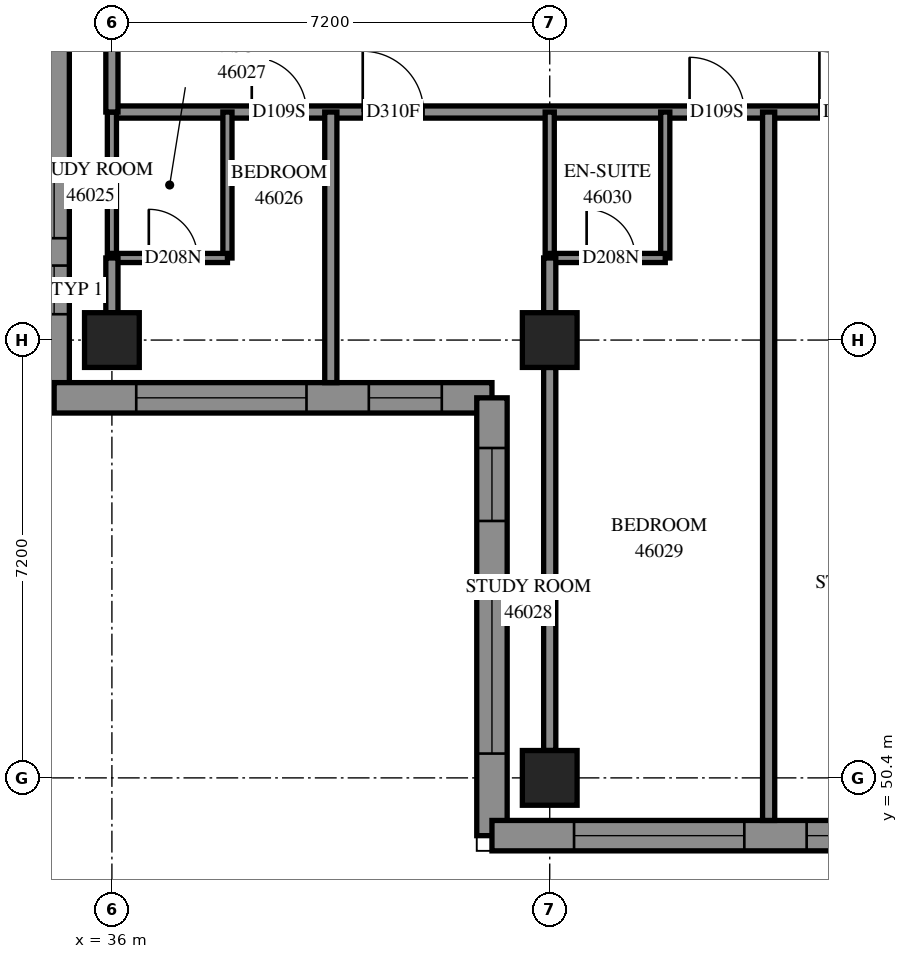
"""IFC4 building model, lengths in metres.
Left out: names, types, materials, properties, quantities, classifications, styles, units other than length and angle.
Written with IfcOpenShell. Run it as: python <this file> out.ifc"""

import sys

from ifc_helpers import new_model, si_unit, direction, frame, frame_2d, origin, origin_2d, place, context, subcontext, project, spatial, polyline, rectangle, outline, extrude, element, fill, save


model = new_model("IFC4")
c1 = context("Model", 3, precision=1e-05, world=origin(), true_north=direction((0.0, 1.0)))
c2 = subcontext(c1, "Body", "Model", "MODEL_VIEW")
j1 = project(units=[si_unit("LENGTHUNIT", "METRE"), si_unit("PLANEANGLEUNIT", "RADIAN")], contexts=[c1])
p1 = place(None, origin())
s1 = spatial("IfcSite", under=j1, at=p1, CompositionType="ELEMENT")
p2 = place(p1, origin())
s2 = spatial("IfcBuilding", under=s1, at=p2, CompositionType="ELEMENT")
p3 = place(p2, frame((0.0, 0.0, 169.4)))
s3 = spatial("IfcBuildingStorey", under=s2, at=p3, CompositionType="ELEMENT", Elevation=169.4)
for number, where, z_axis, x_axis in (
    (1, (36.0, 57.6, 0.0), (0.0, 0.0, 1.0), (1.0, 0.0, 0.0)),
    (2, (43.2, 50.4, 0.0), (0.0, 0.0, 1.0), (1.0, 0.0, 0.0)),
    (3, (43.2, 57.6, 0.0), (0.0, 0.0, 1.0), (1.0, 0.0, 0.0)),
):
    element("IfcColumn", number, at=place(p3, frame(where, z_axis=z_axis, x_axis=x_axis)), inside=s3, PredefinedType="COLUMN", context=c2, shape_type="SweptSolid", body=[
        extrude(rectangle(XDim=0.9, YDim=0.9, at=origin_2d()), origin(), (0.0, 0.0, 1.0), 3.1),
    ])
p4 = place(p3, frame((35.05, 62.647, 0.0), z_axis=(0.0, 0.0, 1.0), x_axis=(0.0, -1.0, 0.0)))
e4 = element("IfcWall", 4, at=p4, inside=s3, PredefinedType="SOLIDWALL", context=c2, shape_type="SweptSolid", body=[
    extrude(outline(polyline([(0.25, -0.25), (6.247, -0.25), (5.747, 0.25), (-0.25, 0.25), (0.25, -0.25)])), origin(), (0.0, 0.0, 1.0), 3.1),
])
p5 = place(p4, frame((2.072, 0.0, 0.45)))
e5 = element("IfcOpeningElement", 5, at=p5, cuts=e4, PredefinedType="OPENING", context=c2, shape_type="SweptSolid", body=[
    extrude(rectangle(XDim=1.3, YDim=2.5, at=frame_2d((0.65, 1.25))), frame((0.0, 0.26, 0.0), z_axis=(0.0, -1.0, 0.0), x_axis=(1.0, 0.0, 0.0)), (0.0, 0.0, 1.0), 0.52),
])
p6 = place(p4, frame((3.822, 0.0, 0.45)))
e6 = element("IfcOpeningElement", 6, at=p6, cuts=e4, PredefinedType="OPENING", context=c2, shape_type="SweptSolid", body=[
    extrude(rectangle(XDim=0.8, YDim=2.5, at=frame_2d((0.4, 1.25))), frame((0.0, 0.26, 0.0), z_axis=(0.0, -1.0, 0.0), x_axis=(1.0, 0.0, 0.0)), (0.0, 0.0, 1.0), 0.52),
])
p7 = place(p3, frame((35.05, 56.65, 0.0), z_axis=(0.0, 0.0, 1.0), x_axis=(1.0, 0.0, 0.0)))
e7 = element("IfcWall", 7, at=p7, inside=s3, PredefinedType="SOLIDWALL", context=c2, shape_type="SweptSolid", body=[
    extrude(outline(polyline([(-0.25, -0.25), (6.95, -0.25), (7.45, 0.25), (0.25, 0.25), (-0.25, -0.25)])), origin(), (0.0, 0.0, 1.0), 3.1),
])
p8 = place(p7, frame((1.35, 0.0, 0.45)))
e8 = element("IfcOpeningElement", 8, at=p8, cuts=e7, PredefinedType="OPENING", context=c2, shape_type="SweptSolid", body=[
    extrude(rectangle(XDim=2.8, YDim=2.5, at=frame_2d((1.4, 1.25))), frame((0.0, 0.26, 0.0), z_axis=(0.0, -1.0, 0.0), x_axis=(1.0, 0.0, 0.0)), (0.0, 0.0, 1.0), 0.52),
])
p9 = place(p7, frame((5.175, 0.0, 0.45)))
e9 = element("IfcOpeningElement", 9, at=p9, cuts=e7, PredefinedType="OPENING", context=c2, shape_type="SweptSolid", body=[
    extrude(rectangle(XDim=1.2, YDim=2.5, at=frame_2d((0.6, 1.25))), frame((0.0, 0.26, 0.0), z_axis=(0.0, -1.0, 0.0), x_axis=(1.0, 0.0, 0.0)), (0.0, 0.0, 1.0), 0.52),
])
p10 = place(p3, frame((42.25, 56.65, 0.0), z_axis=(0.0, 0.0, 1.0), x_axis=(0.0, -1.0, 0.0)))
e10 = element("IfcWall", 10, at=p10, inside=s3, PredefinedType="SOLIDWALL", context=c2, shape_type="SweptSolid", body=[
    extrude(outline(polyline([(0.25, -0.25), (7.45, -0.25), (6.95, 0.25), (-0.25, 0.25), (0.25, -0.25)])), origin(), (0.0, 0.0, 1.0), 3.1),
])
p11 = place(p10, frame((3.05, 0.0, 0.45)))
e11 = element("IfcOpeningElement", 11, at=p11, cuts=e10, PredefinedType="OPENING", context=c2, shape_type="SweptSolid", body=[
    extrude(rectangle(XDim=2.8, YDim=2.5, at=frame_2d((1.4, 1.25))), frame((0.0, 0.26, 0.0), z_axis=(0.0, -1.0, 0.0), x_axis=(1.0, 0.0, 0.0)), (0.0, 0.0, 1.0), 0.52),
])
p12 = place(p10, frame((0.825, 0.0, 0.45)))
e12 = element("IfcOpeningElement", 12, at=p12, cuts=e10, PredefinedType="OPENING", context=c2, shape_type="SweptSolid", body=[
    extrude(rectangle(XDim=1.2, YDim=2.5, at=frame_2d((0.6, 1.25))), frame((0.0, 0.26, 0.0), z_axis=(0.0, -1.0, 0.0), x_axis=(1.0, 0.0, 0.0)), (0.0, 0.0, 1.0), 0.52),
])
p13 = place(p3, frame((42.25, 49.45, 0.0), z_axis=(0.0, 0.0, 1.0), x_axis=(1.0, 0.0, 0.0)))
e13 = element("IfcWall", 13, at=p13, inside=s3, PredefinedType="SOLIDWALL", context=c2, shape_type="SweptSolid", body=[
    extrude(outline(polyline([(-0.25, -0.25), (6.95, -0.25), (7.45, 0.25), (0.25, 0.25), (-0.25, -0.25)])), origin(), (0.0, 0.0, 1.0), 3.1),
])
p14 = place(p13, frame((1.35, 0.0, 0.45)))
e14 = element("IfcOpeningElement", 14, at=p14, cuts=e13, PredefinedType="OPENING", context=c2, shape_type="SweptSolid", body=[
    extrude(rectangle(XDim=2.8, YDim=2.5, at=frame_2d((1.4, 1.25))), frame((0.0, 0.26, 0.0), z_axis=(0.0, -1.0, 0.0), x_axis=(1.0, 0.0, 0.0)), (0.0, 0.0, 1.0), 0.52),
])
p15 = place(p13, frame((5.175, 0.0, 0.45)))
e15 = element("IfcOpeningElement", 15, at=p15, cuts=e13, PredefinedType="OPENING", context=c2, shape_type="SweptSolid", body=[
    extrude(rectangle(XDim=1.2, YDim=2.5, at=frame_2d((0.6, 1.25))), frame((0.0, 0.26, 0.0), z_axis=(0.0, -1.0, 0.0), x_axis=(1.0, 0.0, 0.0)), (0.0, 0.0, 1.0), 0.52),
])
p16 = place(p3, frame((36.0, 61.35, 0.0), z_axis=(0.0, 0.0, 1.0), x_axis=(1.0, 0.0, 0.0)))
e16 = element("IfcWall", 16, at=p16, inside=s3, PredefinedType="PARTITIONING", context=c2, shape_type="SweptSolid", body=[
    extrude(rectangle(XDim=16.95, YDim=0.2, at=frame_2d((8.475, 0.0))), origin(), (0.0, 0.0, 1.0), 3.1),
])
p17 = place(p16, frame((2.3, 0.0, 0.0)))
e17 = element("IfcOpeningElement", 17, at=p17, cuts=e16, PredefinedType="OPENING", context=c2, shape_type="SweptSolid", body=[
    extrude(rectangle(XDim=0.9, YDim=2.1, at=frame_2d((0.45, 1.05))), frame((0.0, 0.11, 0.0), z_axis=(0.0, -1.0, 0.0), x_axis=(1.0, 0.0, 0.0)), (0.0, 0.0, 1.0), 0.22),
])
p18 = place(p16, frame((4.125, 0.0, 0.0)))
e18 = element("IfcOpeningElement", 18, at=p18, cuts=e16, PredefinedType="OPENING", context=c2, shape_type="SweptSolid", body=[
    extrude(rectangle(XDim=1.0, YDim=2.1, at=frame_2d((0.5, 1.05))), frame((0.0, 0.11, 0.0), z_axis=(0.0, -1.0, 0.0), x_axis=(1.0, 0.0, 0.0)), (0.0, 0.0, 1.0), 0.22),
])
p19 = place(p16, frame((9.5, 0.0, 0.0)))
e19 = element("IfcOpeningElement", 19, at=p19, cuts=e16, PredefinedType="OPENING", context=c2, shape_type="SweptSolid", body=[
    extrude(rectangle(XDim=0.9, YDim=2.1, at=frame_2d((0.45, 1.05))), frame((0.0, 0.11, 0.0), z_axis=(0.0, -1.0, 0.0), x_axis=(1.0, 0.0, 0.0)), (0.0, 0.0, 1.0), 0.22),
])
p20 = place(p16, frame((11.635, 0.0, 0.0)))
e20 = element("IfcOpeningElement", 20, at=p20, cuts=e16, PredefinedType="OPENING", context=c2, shape_type="SweptSolid", body=[
    extrude(rectangle(XDim=1.0, YDim=2.1, at=frame_2d((0.5, 1.05))), frame((0.0, 0.11, 0.0), z_axis=(0.0, -1.0, 0.0), x_axis=(1.0, 0.0, 0.0)), (0.0, 0.0, 1.0), 0.22),
])
p21 = place(p16, frame((15.803, 0.0, 0.0)))
e21 = element("IfcOpeningElement", 21, at=p21, cuts=e16, PredefinedType="OPENING", context=c2, shape_type="SweptSolid", body=[
    extrude(rectangle(XDim=1.0, YDim=2.1, at=frame_2d((0.5, 1.05))), frame((0.0, 0.11, 0.0), z_axis=(0.0, -1.0, 0.0), x_axis=(1.0, 0.0, 0.0)), (0.0, 0.0, 1.0), 0.22),
])
p22 = place(p3, frame((46.8, 49.7, 0.0), z_axis=(0.0, 0.0, 1.0), x_axis=(0.0, 1.0, 0.0)))
e22 = element("IfcWall", 22, at=p22, inside=s3, PredefinedType="PARTITIONING", context=c2, shape_type="SweptSolid", body=[
    extrude(rectangle(XDim=11.65, YDim=0.2, at=frame_2d((5.825, 0.0))), origin(), (0.0, 0.0, 1.0), 3.1),
])
p23 = place(p3, frame((43.2, 50.85, 0.0), z_axis=(0.0, 0.0, 1.0), x_axis=(0.0, 1.0, 0.0)))
e23 = element("IfcWall", 23, at=p23, inside=s3, PredefinedType="PARTITIONING", context=c2, shape_type="SweptSolid", body=[
    extrude(rectangle(XDim=6.3, YDim=0.2, at=frame_2d((3.15, 0.0))), origin(), (0.0, 0.0, 1.0), 2.6),
])
p24 = place(p3, frame((39.6, 56.9, 0.0), z_axis=(0.0, 0.0, 1.0), x_axis=(0.0, 1.0, 0.0)))
e24 = element("IfcWall", 24, at=p24, inside=s3, PredefinedType="PARTITIONING", context=c2, shape_type="SweptSolid", body=[
    extrude(rectangle(XDim=4.45, YDim=0.2, at=frame_2d((2.225, 0.0))), origin(), (0.0, 0.0, 1.0), 3.1),
])
p25 = place(p3, frame((37.9, 58.95, 0.0), z_axis=(0.0, 0.0, 1.0), x_axis=(0.0, 1.0, 0.0)))
e25 = element("IfcWall", 25, at=p25, inside=s3, PredefinedType="PARTITIONING", context=c2, shape_type="SweptSolid", body=[
    extrude(rectangle(XDim=2.4, YDim=0.15, at=frame_2d((1.2, 0.0))), origin(), (0.0, 0.0, 1.0), 3.1),
])
p26 = place(p3, frame((36.0, 58.95, 0.0), z_axis=(0.0, 0.0, 1.0), x_axis=(0.0, 1.0, 0.0)))
e26 = element("IfcWall", 26, at=p26, inside=s3, PredefinedType="PARTITIONING", context=c2, shape_type="SweptSolid", body=[
    extrude(rectangle(XDim=2.4, YDim=0.15, at=frame_2d((1.2, 0.0))), origin(), (0.0, 0.0, 1.0), 2.6),
])
for number, where, z_axis, x_axis in (
    (27, (45.1, 58.95, 0.0), (0.0, 0.0, 1.0), (0.0, 1.0, 0.0)),
    (28, (43.2, 58.95, 0.0), (0.0, 0.0, 1.0), (0.0, 1.0, 0.0)),
):
    element("IfcWall", number, at=place(p3, frame(where, z_axis=z_axis, x_axis=x_axis)), inside=s3, PredefinedType="PARTITIONING", context=c2, shape_type="SweptSolid", body=[
        extrude(rectangle(XDim=2.4, YDim=0.15, at=frame_2d((1.2, 0.0))), origin(), (0.0, 0.0, 1.0), 3.1),
    ])
p27 = place(p3, frame((36.0, 61.35, 0.0), z_axis=(0.0, 0.0, 1.0), x_axis=(0.0, 1.0, 0.0)))
e29 = element("IfcWall", 29, at=p27, inside=s3, PredefinedType="PARTITIONING", context=c2, shape_type="SweptSolid", body=[
    extrude(rectangle(XDim=2.1, YDim=0.2, at=frame_2d((1.05, 0.0))), origin(), (0.0, 0.0, 1.0), 2.6),
])
p28 = place(p3, frame((36.0, 58.95, 0.0), z_axis=(0.0, 0.0, 1.0), x_axis=(1.0, 0.0, 0.0)))
e30 = element("IfcWall", 30, at=p28, inside=s3, PredefinedType="PARTITIONING", context=c2, shape_type="SweptSolid", body=[
    extrude(rectangle(XDim=1.9, YDim=0.15, at=frame_2d((0.95, 0.0))), origin(), (0.0, 0.0, 1.0), 3.1),
])
p29 = place(p28, frame((0.607, 0.0, 0.0)))
e31 = element("IfcOpeningElement", 31, at=p29, cuts=e30, PredefinedType="OPENING", context=c2, shape_type="SweptSolid", body=[
    extrude(rectangle(XDim=0.8, YDim=2.1, at=frame_2d((0.4, 1.05))), frame((0.0, 0.085, 0.0), z_axis=(0.0, -1.0, 0.0), x_axis=(1.0, 0.0, 0.0)), (0.0, 0.0, 1.0), 0.17),
])
p30 = place(p3, frame((43.2, 58.95, 0.0), z_axis=(0.0, 0.0, 1.0), x_axis=(1.0, 0.0, 0.0)))
e32 = element("IfcWall", 32, at=p30, inside=s3, PredefinedType="PARTITIONING", context=c2, shape_type="SweptSolid", body=[
    extrude(rectangle(XDim=1.9, YDim=0.15, at=frame_2d((0.95, 0.0))), origin(), (0.0, 0.0, 1.0), 3.1),
])
p31 = place(p30, frame((0.607, 0.0, 0.0)))
e33 = element("IfcOpeningElement", 33, at=p31, cuts=e32, PredefinedType="OPENING", context=c2, shape_type="SweptSolid", body=[
    extrude(rectangle(XDim=0.8, YDim=2.1, at=frame_2d((0.4, 1.05))), frame((0.0, 0.085, 0.0), z_axis=(0.0, -1.0, 0.0), x_axis=(1.0, 0.0, 0.0)), (0.0, 0.0, 1.0), 0.17),
])
p32 = place(p3, frame((36.0, 58.05, 0.0), z_axis=(0.0, 0.0, 1.0), x_axis=(0.0, 1.0, 0.0)))
e34 = element("IfcWall", 34, at=p32, inside=s3, PredefinedType="PARTITIONING", context=c2, shape_type="SweptSolid", body=[
    extrude(rectangle(XDim=0.9, YDim=0.2, at=frame_2d((0.45, 0.0))), origin(), (0.0, 0.0, 1.0), 2.6),
])
p33 = place(p3, frame((43.2, 58.05, 0.0), z_axis=(0.0, 0.0, 1.0), x_axis=(0.0, 1.0, 0.0)))
e35 = element("IfcWall", 35, at=p33, inside=s3, PredefinedType="PARTITIONING", context=c2, shape_type="SweptSolid", body=[
    extrude(rectangle(XDim=0.9, YDim=0.2, at=frame_2d((0.45, 0.0))), origin(), (0.0, 0.0, 1.0), 3.1),
])
p34 = place(p8, origin())
e36 = element("IfcWindow", 36, at=p34, inside=s3, PartitioningType="SINGLE_PANEL", PredefinedType="WINDOW", context=c2, shape_type="SweptSolid", body=[
    extrude(rectangle(XDim=2.8, YDim=2.5, at=frame_2d((1.4, 1.25))), frame((0.0, 0.18, 0.0), z_axis=(0.0, -1.0, 0.0), x_axis=(1.0, 0.0, 0.0)), (0.0, 0.0, 1.0), 0.06),
])
fill(e8, e36)
p35 = place(p9, origin())
e37 = element("IfcWindow", 37, at=p35, inside=s3, PartitioningType="SINGLE_PANEL", PredefinedType="WINDOW", context=c2, shape_type="SweptSolid", body=[
    extrude(rectangle(XDim=1.2, YDim=2.5, at=frame_2d((0.6, 1.25))), frame((0.0, 0.18, 0.0), z_axis=(0.0, -1.0, 0.0), x_axis=(1.0, 0.0, 0.0)), (0.0, 0.0, 1.0), 0.06),
])
fill(e9, e37)
p36 = place(p11, origin())
e38 = element("IfcWindow", 38, at=p36, inside=s3, PartitioningType="SINGLE_PANEL", PredefinedType="WINDOW", context=c2, shape_type="SweptSolid", body=[
    extrude(rectangle(XDim=2.8, YDim=2.5, at=frame_2d((1.4, 1.25))), frame((0.0, 0.18, 0.0), z_axis=(0.0, -1.0, 0.0), x_axis=(1.0, 0.0, 0.0)), (0.0, 0.0, 1.0), 0.06),
])
fill(e11, e38)
p37 = place(p12, origin())
e39 = element("IfcWindow", 39, at=p37, inside=s3, PartitioningType="SINGLE_PANEL", PredefinedType="WINDOW", context=c2, shape_type="SweptSolid", body=[
    extrude(rectangle(XDim=1.2, YDim=2.5, at=frame_2d((0.6, 1.25))), frame((0.0, 0.18, 0.0), z_axis=(0.0, -1.0, 0.0), x_axis=(1.0, 0.0, 0.0)), (0.0, 0.0, 1.0), 0.06),
])
fill(e12, e39)
p38 = place(p14, origin())
e40 = element("IfcWindow", 40, at=p38, inside=s3, PartitioningType="SINGLE_PANEL", PredefinedType="WINDOW", context=c2, shape_type="SweptSolid", body=[
    extrude(rectangle(XDim=2.8, YDim=2.5, at=frame_2d((1.4, 1.25))), frame((0.0, 0.18, 0.0), z_axis=(0.0, -1.0, 0.0), x_axis=(1.0, 0.0, 0.0)), (0.0, 0.0, 1.0), 0.06),
])
fill(e14, e40)
p39 = place(p15, origin())
e41 = element("IfcWindow", 41, at=p39, inside=s3, PartitioningType="SINGLE_PANEL", PredefinedType="WINDOW", context=c2, shape_type="SweptSolid", body=[
    extrude(rectangle(XDim=1.2, YDim=2.5, at=frame_2d((0.6, 1.25))), frame((0.0, 0.18, 0.0), z_axis=(0.0, -1.0, 0.0), x_axis=(1.0, 0.0, 0.0)), (0.0, 0.0, 1.0), 0.06),
])
fill(e15, e41)
p40 = place(p17, origin())
e42 = element("IfcDoor", 42, at=p40, inside=s3, OperationType="SINGLE_SWING_LEFT", PredefinedType="DOOR", context=c2, shape_type="SweptSolid", body=[
    extrude(rectangle(XDim=0.9, YDim=2.1, at=frame_2d((0.45, 1.05))), frame((0.0, 0.025, 0.0), z_axis=(0.0, -1.0, 0.0), x_axis=(1.0, 0.0, 0.0)), (0.0, 0.0, 1.0), 0.05),
])
fill(e17, e42)
p41 = place(p29, origin())
e43 = element("IfcDoor", 43, at=p41, inside=s3, OperationType="SINGLE_SWING_RIGHT", PredefinedType="DOOR", context=c2, shape_type="SweptSolid", body=[
    extrude(rectangle(XDim=0.8, YDim=2.1, at=frame_2d((0.4, 1.05))), frame((0.0, 0.025, 0.0), z_axis=(0.0, -1.0, 0.0), x_axis=(1.0, 0.0, 0.0)), (0.0, 0.0, 1.0), 0.05),
])
fill(e31, e43)
p42 = place(p18, origin())
e44 = element("IfcDoor", 44, at=p42, inside=s3, OperationType="SINGLE_SWING_RIGHT", PredefinedType="DOOR", context=c2, shape_type="SweptSolid", body=[
    extrude(rectangle(XDim=1.0, YDim=2.1, at=frame_2d((0.5, 1.05))), frame((0.0, 0.025, 0.0), z_axis=(0.0, -1.0, 0.0), x_axis=(1.0, 0.0, 0.0)), (0.0, 0.0, 1.0), 0.05),
])
fill(e18, e44)
p43 = place(p19, origin())
e45 = element("IfcDoor", 45, at=p43, inside=s3, OperationType="SINGLE_SWING_LEFT", PredefinedType="DOOR", context=c2, shape_type="SweptSolid", body=[
    extrude(rectangle(XDim=0.9, YDim=2.1, at=frame_2d((0.45, 1.05))), frame((0.0, 0.025, 0.0), z_axis=(0.0, -1.0, 0.0), x_axis=(1.0, 0.0, 0.0)), (0.0, 0.0, 1.0), 0.05),
])
fill(e19, e45)
p44 = place(p31, origin())
e46 = element("IfcDoor", 46, at=p44, inside=s3, OperationType="SINGLE_SWING_RIGHT", PredefinedType="DOOR", context=c2, shape_type="SweptSolid", body=[
    extrude(rectangle(XDim=0.8, YDim=2.1, at=frame_2d((0.4, 1.05))), frame((0.0, 0.025, 0.0), z_axis=(0.0, -1.0, 0.0), x_axis=(1.0, 0.0, 0.0)), (0.0, 0.0, 1.0), 0.05),
])
fill(e33, e46)
p45 = place(p20, origin())
e47 = element("IfcDoor", 47, at=p45, inside=s3, OperationType="SINGLE_SWING_RIGHT", PredefinedType="DOOR", context=c2, shape_type="SweptSolid", body=[
    extrude(rectangle(XDim=1.0, YDim=2.1, at=frame_2d((0.5, 1.05))), frame((0.0, 0.025, 0.0), z_axis=(0.0, -1.0, 0.0), x_axis=(1.0, 0.0, 0.0)), (0.0, 0.0, 1.0), 0.05),
])
fill(e20, e47)
p46 = place(p5, origin())
e48 = element("IfcWindow", 48, at=p46, inside=s3, PartitioningType="SINGLE_PANEL", PredefinedType="WINDOW", context=c2, shape_type="SweptSolid", body=[
    extrude(rectangle(XDim=1.3, YDim=2.5, at=frame_2d((0.65, 1.25))), frame((0.0, 0.18, 0.0), z_axis=(0.0, -1.0, 0.0), x_axis=(1.0, 0.0, 0.0)), (0.0, 0.0, 1.0), 0.06),
])
fill(e5, e48)
p47 = place(p6, origin())
e49 = element("IfcWindow", 49, at=p47, inside=s3, PartitioningType="SINGLE_PANEL", PredefinedType="WINDOW", context=c2, shape_type="SweptSolid", body=[
    extrude(rectangle(XDim=0.8, YDim=2.5, at=frame_2d((0.4, 1.25))), frame((0.0, 0.18, 0.0), z_axis=(0.0, -1.0, 0.0), x_axis=(1.0, 0.0, 0.0)), (0.0, 0.0, 1.0), 0.06),
])
fill(e6, e49)
save(model, sys.argv[1])
